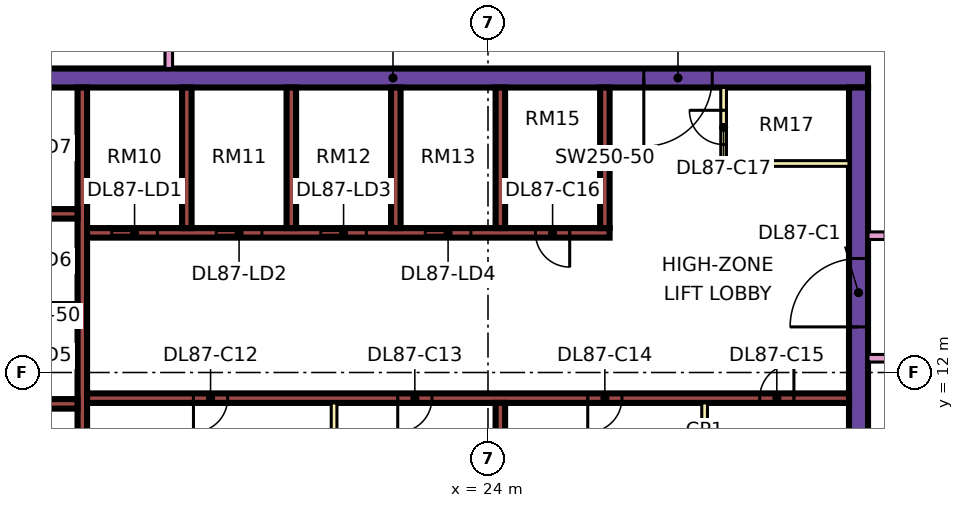
"""IFC4 building model, lengths in metres.
Left out: names, types, materials, properties, quantities, classifications, styles, units other than length and angle.
Written with IfcOpenShell. Run it as: python <this file> out.ifc"""

import sys

from ifc_helpers import new_model, si_unit, direction, frame, frame_2d, origin, place, context, subcontext, project, spatial, rectangle, extrude, element, fill, save


model = new_model("IFC4")
c1 = context("Model", 3, precision=1e-05, world=origin(), true_north=direction((0.0, 1.0)))
c2 = subcontext(c1, "Body", "Model", "MODEL_VIEW")
j1 = project(units=[si_unit("LENGTHUNIT", "METRE"), si_unit("PLANEANGLEUNIT", "RADIAN")], contexts=[c1])
p1 = place(None, origin())
s1 = spatial("IfcSite", under=j1, at=p1, CompositionType="ELEMENT")
p2 = place(p1, origin())
s2 = spatial("IfcBuilding", under=s1, at=p2, CompositionType="ELEMENT")
p3 = place(p2, frame((0.0, 0.0, 372.65)))
s3 = spatial("IfcBuildingStorey", under=s2, at=p3, CompositionType="ELEMENT", Elevation=372.65)
p4 = place(p3, frame((9.0, 19.75, 0.0), z_axis=(0.0, 0.0, 1.0), x_axis=(1.0, 0.0, 0.0)))
e1 = element("IfcWall", 1, at=p4, inside=s3, PredefinedType="SHEAR", context=c2, shape_type="SweptSolid", body=[
    extrude(rectangle(XDim=25.0, YDim=0.5, at=frame_2d((12.5, 0.0))), origin(), (0.0, 0.0, 1.0), 3.75),
])
p5 = place(p4, frame((19.1, 0.0, 0.0)))
e2 = element("IfcOpeningElement", 2, at=p5, cuts=e1, PredefinedType="OPENING", context=c2, shape_type="SweptSolid", body=[
    extrude(rectangle(XDim=1.8, YDim=2.4, at=frame_2d((0.9, 1.2))), frame((0.0, 0.26, 0.0), z_axis=(0.0, -1.0, 0.0), x_axis=(1.0, 0.0, 0.0)), (0.0, 0.0, 1.0), 0.52),
])
p6 = place(p3, frame((33.75, 7.5, 0.0), z_axis=(0.0, 0.0, 1.0), x_axis=(0.0, 1.0, 0.0)))
e3 = element("IfcWall", 3, at=p6, inside=s3, PredefinedType="SHEAR", context=c2, shape_type="SweptSolid", body=[
    extrude(rectangle(XDim=12.0, YDim=0.5, at=frame_2d((6.0, 0.0))), origin(), (0.0, 0.0, 1.0), 3.75),
])
p7 = place(p6, frame((5.7, 0.0, 0.0)))
e4 = element("IfcOpeningElement", 4, at=p7, cuts=e3, PredefinedType="OPENING", context=c2, shape_type="SweptSolid", body=[
    extrude(rectangle(XDim=1.8, YDim=2.4, at=frame_2d((0.9, 1.2))), frame((0.0, 0.26, 0.0), z_axis=(0.0, -1.0, 0.0), x_axis=(1.0, 0.0, 0.0)), (0.0, 0.0, 1.0), 0.52),
])
p8 = place(p3, frame((13.325, 7.5, 0.0), z_axis=(0.0, 0.0, 1.0), x_axis=(0.0, 1.0, 0.0)))
e5 = element("IfcWall", 5, at=p8, inside=s3, PredefinedType="SHEAR", context=c2, shape_type="SweptSolid", body=[
    extrude(rectangle(XDim=12.0, YDim=0.25, at=frame_2d((6.0, 0.0))), origin(), (0.0, 0.0, 1.0), 3.75),
])
p9 = place(p3, frame((13.45, 11.325, 0.0), z_axis=(0.0, 0.0, 1.0), x_axis=(1.0, 0.0, 0.0)))
e6 = element("IfcWall", 6, at=p9, inside=s3, PredefinedType="SHEAR", context=c2, shape_type="SweptSolid", body=[
    extrude(rectangle(XDim=20.05, YDim=0.25, at=frame_2d((10.025, 0.0))), origin(), (0.0, 0.0, 1.0), 3.75),
])
p10 = place(p9, frame((2.8, 0.0, 0.0)))
e7 = element("IfcOpeningElement", 7, at=p10, cuts=e6, PredefinedType="OPENING", context=c2, shape_type="SweptSolid", body=[
    extrude(rectangle(XDim=0.9, YDim=2.1, at=frame_2d((0.45, 1.05))), frame((0.0, 0.135, 0.0), z_axis=(0.0, -1.0, 0.0), x_axis=(1.0, 0.0, 0.0)), (0.0, 0.0, 1.0), 0.27),
])
p11 = place(p9, frame((8.175, 0.0, 0.0)))
e8 = element("IfcOpeningElement", 8, at=p11, cuts=e6, PredefinedType="OPENING", context=c2, shape_type="SweptSolid", body=[
    extrude(rectangle(XDim=0.9, YDim=2.1, at=frame_2d((0.45, 1.05))), frame((0.0, 0.135, 0.0), z_axis=(0.0, -1.0, 0.0), x_axis=(1.0, 0.0, 0.0)), (0.0, 0.0, 1.0), 0.27),
])
p12 = place(p9, frame((13.175, 0.0, 0.0)))
e9 = element("IfcOpeningElement", 9, at=p12, cuts=e6, PredefinedType="OPENING", context=c2, shape_type="SweptSolid", body=[
    extrude(rectangle(XDim=0.9, YDim=2.1, at=frame_2d((0.45, 1.05))), frame((0.0, 0.135, 0.0), z_axis=(0.0, -1.0, 0.0), x_axis=(1.0, 0.0, 0.0)), (0.0, 0.0, 1.0), 0.27),
])
p13 = place(p9, frame((17.7, 0.0, 0.0)))
e10 = element("IfcOpeningElement", 10, at=p13, cuts=e6, PredefinedType="OPENING", context=c2, shape_type="SweptSolid", body=[
    extrude(rectangle(XDim=0.9, YDim=2.1, at=frame_2d((0.45, 1.05))), frame((0.0, 0.135, 0.0), z_axis=(0.0, -1.0, 0.0), x_axis=(1.0, 0.0, 0.0)), (0.0, 0.0, 1.0), 0.27),
])
p14 = place(p3, frame((13.45, 15.675, 0.0), z_axis=(0.0, 0.0, 1.0), x_axis=(1.0, 0.0, 0.0)))
e11 = element("IfcWall", 11, at=p14, inside=s3, PredefinedType="SHEAR", context=c2, shape_type="SweptSolid", body=[
    extrude(rectangle(XDim=13.75, YDim=0.25, at=frame_2d((6.875, 0.0))), origin(), (0.0, 0.0, 1.0), 3.75),
])
p15 = place(p14, frame((0.65, 0.0, 0.0)))
e12 = element("IfcOpeningElement", 12, at=p15, cuts=e11, PredefinedType="OPENING", context=c2, shape_type="SweptSolid", body=[
    extrude(rectangle(XDim=1.2, YDim=2.2, at=frame_2d((0.6, 1.1))), frame((0.0, 0.135, 0.0), z_axis=(0.0, -1.0, 0.0), x_axis=(1.0, 0.0, 0.0)), (0.0, 0.0, 1.0), 0.27),
])
p16 = place(p14, frame((3.4, 0.0, 0.0)))
e13 = element("IfcOpeningElement", 13, at=p16, cuts=e11, PredefinedType="OPENING", context=c2, shape_type="SweptSolid", body=[
    extrude(rectangle(XDim=1.2, YDim=2.2, at=frame_2d((0.6, 1.1))), frame((0.0, 0.135, 0.0), z_axis=(0.0, -1.0, 0.0), x_axis=(1.0, 0.0, 0.0)), (0.0, 0.0, 1.0), 0.27),
])
p17 = place(p14, frame((6.15, 0.0, 0.0)))
e14 = element("IfcOpeningElement", 14, at=p17, cuts=e11, PredefinedType="OPENING", context=c2, shape_type="SweptSolid", body=[
    extrude(rectangle(XDim=1.2, YDim=2.2, at=frame_2d((0.6, 1.1))), frame((0.0, 0.135, 0.0), z_axis=(0.0, -1.0, 0.0), x_axis=(1.0, 0.0, 0.0)), (0.0, 0.0, 1.0), 0.27),
])
p18 = place(p14, frame((8.9, 0.0, 0.0)))
e15 = element("IfcOpeningElement", 15, at=p18, cuts=e11, PredefinedType="OPENING", context=c2, shape_type="SweptSolid", body=[
    extrude(rectangle(XDim=1.2, YDim=2.2, at=frame_2d((0.6, 1.1))), frame((0.0, 0.135, 0.0), z_axis=(0.0, -1.0, 0.0), x_axis=(1.0, 0.0, 0.0)), (0.0, 0.0, 1.0), 0.27),
])
p19 = place(p14, frame((11.8, 0.0, 0.0)))
e16 = element("IfcOpeningElement", 16, at=p19, cuts=e11, PredefinedType="OPENING", context=c2, shape_type="SweptSolid", body=[
    extrude(rectangle(XDim=0.9, YDim=2.1, at=frame_2d((0.45, 1.05))), frame((0.0, 0.135, 0.0), z_axis=(0.0, -1.0, 0.0), x_axis=(1.0, 0.0, 0.0)), (0.0, 0.0, 1.0), 0.27),
])
for number, where, z_axis, x_axis in (
    (17, (10.2, 11.175, 0.0), (0.0, 0.0, 1.0), (1.0, 0.0, 0.0)),
    (18, (10.2, 13.675, 0.0), (0.0, 0.0, 1.0), (1.0, 0.0, 0.0)),
    (19, (10.2, 16.175, 0.0), (0.0, 0.0, 1.0), (1.0, 0.0, 0.0)),
):
    element("IfcWall", number, at=place(p3, frame(where, z_axis=z_axis, x_axis=x_axis)), inside=s3, PredefinedType="SHEAR", context=c2, shape_type="SweptSolid", body=[
        extrude(rectangle(XDim=3.0, YDim=0.25, at=frame_2d((1.5, 0.0))), origin(), (0.0, 0.0, 1.0), 3.75),
    ])
for number, where, z_axis, x_axis in (
    (20, (24.325, 7.5, 0.0), (0.0, 0.0, 1.0), (0.0, 1.0, 0.0)),
    (21, (16.075, 15.8, 0.0), (0.0, 0.0, 1.0), (0.0, 1.0, 0.0)),
    (22, (18.825, 15.8, 0.0), (0.0, 0.0, 1.0), (0.0, 1.0, 0.0)),
    (23, (21.575, 15.8, 0.0), (0.0, 0.0, 1.0), (0.0, 1.0, 0.0)),
    (24, (24.325, 15.8, 0.0), (0.0, 0.0, 1.0), (0.0, 1.0, 0.0)),
    (25, (27.075, 15.8, 0.0), (0.0, 0.0, 1.0), (0.0, 1.0, 0.0)),
):
    element("IfcWall", number, at=place(p3, frame(where, z_axis=z_axis, x_axis=x_axis)), inside=s3, PredefinedType="SHEAR", context=c2, shape_type="SweptSolid", body=[
        extrude(rectangle(XDim=3.7, YDim=0.25, at=frame_2d((1.85, 0.0))), origin(), (0.0, 0.0, 1.0), 3.75),
    ])
p20 = place(p3, frame((-1.447, 12.553, 0.0), z_axis=(0.0, 0.0, 1.0), x_axis=(0.707106781187, -0.707106781187, 0.0)))
e26 = element("IfcWall", 26, at=p20, inside=s3, PredefinedType="SOLIDWALL", context=c2, shape_type="SweptSolid", body=[
    extrude(rectangle(XDim=19.799, YDim=0.15, at=frame_2d((9.899, 0.0))), origin(), (0.0, 0.0, 1.0), 3.35),
])
p21 = place(p20, frame((2.212, 0.0, 0.45)))
e27 = element("IfcOpeningElement", 27, at=p21, cuts=e26, PredefinedType="OPENING", context=c2, shape_type="SweptSolid", body=[
    extrude(rectangle(XDim=3.0, YDim=2.4, at=frame_2d((1.5, 1.2))), frame((0.0, 0.085, 0.0), z_axis=(0.0, -1.0, 0.0), x_axis=(1.0, 0.0, 0.0)), (0.0, 0.0, 1.0), 0.17),
])
p22 = place(p20, frame((10.216, 0.0, 0.45)))
e28 = element("IfcOpeningElement", 28, at=p22, cuts=e26, PredefinedType="OPENING", context=c2, shape_type="SweptSolid", body=[
    extrude(rectangle(XDim=3.0, YDim=2.4, at=frame_2d((1.5, 1.2))), frame((0.0, 0.085, 0.0), z_axis=(0.0, -1.0, 0.0), x_axis=(1.0, 0.0, 0.0)), (0.0, 0.0, 1.0), 0.17),
])
for number, where, z_axis, x_axis in (
    (29, (19.95, 7.5, 0.0), (0.0, 0.0, 1.0), (0.0, 1.0, 0.0)),
    (30, (29.7, 7.5, 0.0), (0.0, 0.0, 1.0), (0.0, 1.0, 0.0)),
):
    element("IfcWall", number, at=place(p3, frame(where, z_axis=z_axis, x_axis=x_axis)), inside=s3, PredefinedType="PARTITIONING", context=c2, shape_type="SweptSolid", body=[
        extrude(rectangle(XDim=3.7, YDim=0.15, at=frame_2d((1.85, 0.0))), origin(), (0.0, 0.0, 1.0), 3.35),
    ])
p23 = place(p3, frame((30.2, 17.5, 0.0), z_axis=(0.0, 0.0, 1.0), x_axis=(0.0, 1.0, 0.0)))
e31 = element("IfcWall", 31, at=p23, inside=s3, PredefinedType="PARTITIONING", context=c2, shape_type="SweptSolid", body=[
    extrude(rectangle(XDim=2.0, YDim=0.15, at=frame_2d((1.0, 0.0))), origin(), (0.0, 0.0, 1.0), 3.35),
])
p24 = place(p23, frame((0.5, 0.0, 0.0)))
e32 = element("IfcOpeningElement", 32, at=p24, cuts=e31, PredefinedType="OPENING", context=c2, shape_type="SweptSolid", body=[
    extrude(rectangle(XDim=0.9, YDim=2.1, at=frame_2d((0.45, 1.05))), frame((0.0, 0.085, 0.0), z_axis=(0.0, -1.0, 0.0), x_axis=(1.0, 0.0, 0.0)), (0.0, 0.0, 1.0), 0.17),
])
p25 = place(p3, frame((30.2, 17.5, 0.0), z_axis=(0.0, 0.0, 1.0), x_axis=(1.0, 0.0, 0.0)))
e33 = element("IfcWall", 33, at=p25, inside=s3, PredefinedType="PARTITIONING", context=c2, shape_type="SweptSolid", body=[
    extrude(rectangle(XDim=3.3, YDim=0.15, at=frame_2d((1.65, 0.0))), origin(), (0.0, 0.0, 1.0), 3.35),
])
p26 = place(p3, frame((15.6, 20.0, 0.0), z_axis=(0.0, 0.0, 1.0), x_axis=(0.0, 1.0, 0.0)))
e34 = element("IfcWall", 34, at=p26, inside=s3, PredefinedType="PARTITIONING", context=c2, shape_type="SweptSolid", body=[
    extrude(rectangle(XDim=27.775, YDim=0.2, at=frame_2d((13.887, 0.0))), origin(), (0.0, 0.0, 1.0), 3.35),
])
p27 = place(p26, frame((7.15, 0.0, 0.0)))
e35 = element("IfcOpeningElement", 35, at=p27, cuts=e34, PredefinedType="OPENING", context=c2, shape_type="SweptSolid", body=[
    extrude(rectangle(XDim=1.6, YDim=2.1, at=frame_2d((0.8, 1.05))), frame((0.0, 0.11, 0.0), z_axis=(0.0, -1.0, 0.0), x_axis=(1.0, 0.0, 0.0)), (0.0, 0.0, 1.0), 0.22),
])
p28 = place(p26, frame((13.5, 0.0, 0.0)))
e36 = element("IfcOpeningElement", 36, at=p28, cuts=e34, PredefinedType="OPENING", context=c2, shape_type="SweptSolid", body=[
    extrude(rectangle(XDim=1.0, YDim=2.1, at=frame_2d((0.5, 1.05))), frame((0.0, 0.11, 0.0), z_axis=(0.0, -1.0, 0.0), x_axis=(1.0, 0.0, 0.0)), (0.0, 0.0, 1.0), 0.22),
])
p29 = place(p26, frame((23.35, 0.0, 0.0)))
e37 = element("IfcOpeningElement", 37, at=p29, cuts=e34, PredefinedType="OPENING", context=c2, shape_type="SweptSolid", body=[
    extrude(rectangle(XDim=1.0, YDim=2.1, at=frame_2d((0.5, 1.05))), frame((0.0, 0.11, 0.0), z_axis=(0.0, -1.0, 0.0), x_axis=(1.0, 0.0, 0.0)), (0.0, 0.0, 1.0), 0.22),
])
p30 = place(p26, frame((1.15, 0.0, 0.0)))
e38 = element("IfcOpeningElement", 38, at=p30, cuts=e34, PredefinedType="OPENING", context=c2, shape_type="SweptSolid", body=[
    extrude(rectangle(XDim=1.8, YDim=2.1, at=frame_2d((0.9, 1.05))), frame((0.0, 0.11, 0.0), z_axis=(0.0, -1.0, 0.0), x_axis=(1.0, 0.0, 0.0)), (0.0, 0.0, 1.0), 0.22),
])
p31 = place(p26, frame((25.9, 0.0, 0.0)))
e39 = element("IfcOpeningElement", 39, at=p31, cuts=e34, PredefinedType="OPENING", context=c2, shape_type="SweptSolid", body=[
    extrude(rectangle(XDim=1.0, YDim=2.1, at=frame_2d((0.5, 1.05))), frame((0.0, 0.11, 0.0), z_axis=(0.0, -1.0, 0.0), x_axis=(1.0, 0.0, 0.0)), (0.0, 0.0, 1.0), 0.22),
])
p32 = place(p3, frame((34.0, 12.375, 0.0), z_axis=(0.0, 0.0, 1.0), x_axis=(1.0, 0.0, 0.0)))
e40 = element("IfcWall", 40, at=p32, inside=s3, PredefinedType="PARTITIONING", context=c2, shape_type="SweptSolid", body=[
    extrude(rectangle(XDim=2.376, YDim=0.2, at=frame_2d((1.188, 0.0))), origin(), (0.0, 0.0, 1.0), 3.35),
])
p33 = place(p3, frame((34.0, 15.6, 0.0), z_axis=(0.0, 0.0, 1.0), x_axis=(1.0, 0.0, 0.0)))
e41 = element("IfcWall", 41, at=p33, inside=s3, PredefinedType="PARTITIONING", context=c2, shape_type="SweptSolid", body=[
    extrude(rectangle(XDim=10.35, YDim=0.2, at=frame_2d((5.175, 0.0))), origin(), (0.0, 0.0, 1.0), 3.35),
])
p34 = place(p33, frame((5.6, 0.0, 0.0)))
e42 = element("IfcOpeningElement", 42, at=p34, cuts=e41, PredefinedType="OPENING", context=c2, shape_type="SweptSolid", body=[
    extrude(rectangle(XDim=1.0, YDim=2.1, at=frame_2d((0.5, 1.05))), frame((0.0, 0.11, 0.0), z_axis=(0.0, -1.0, 0.0), x_axis=(1.0, 0.0, 0.0)), (0.0, 0.0, 1.0), 0.22),
])
p35 = place(p33, frame((0.45, 0.0, 0.0)))
e43 = element("IfcOpeningElement", 43, at=p35, cuts=e41, PredefinedType="OPENING", context=c2, shape_type="SweptSolid", body=[
    extrude(rectangle(XDim=1.2, YDim=2.1, at=frame_2d((0.6, 1.05))), frame((0.0, 0.11, 0.0), z_axis=(0.0, -1.0, 0.0), x_axis=(1.0, 0.0, 0.0)), (0.0, 0.0, 1.0), 0.22),
])
p36 = place(p15, origin())
e44 = element("IfcDoor", 44, at=p36, inside=s3, OperationType="DOUBLE_DOOR_SLIDING", PredefinedType="DOOR", context=c2, shape_type="SweptSolid", body=[
    extrude(rectangle(XDim=1.2, YDim=2.2, at=frame_2d((0.6, 1.1))), frame((0.0, 0.025, 0.0), z_axis=(0.0, -1.0, 0.0), x_axis=(1.0, 0.0, 0.0)), (0.0, 0.0, 1.0), 0.05),
])
fill(e12, e44)
p37 = place(p16, origin())
e45 = element("IfcDoor", 45, at=p37, inside=s3, OperationType="DOUBLE_DOOR_SLIDING", PredefinedType="DOOR", context=c2, shape_type="SweptSolid", body=[
    extrude(rectangle(XDim=1.2, YDim=2.2, at=frame_2d((0.6, 1.1))), frame((0.0, 0.025, 0.0), z_axis=(0.0, -1.0, 0.0), x_axis=(1.0, 0.0, 0.0)), (0.0, 0.0, 1.0), 0.05),
])
fill(e13, e45)
p38 = place(p17, origin())
e46 = element("IfcDoor", 46, at=p38, inside=s3, OperationType="DOUBLE_DOOR_SLIDING", PredefinedType="DOOR", context=c2, shape_type="SweptSolid", body=[
    extrude(rectangle(XDim=1.2, YDim=2.2, at=frame_2d((0.6, 1.1))), frame((0.0, 0.025, 0.0), z_axis=(0.0, -1.0, 0.0), x_axis=(1.0, 0.0, 0.0)), (0.0, 0.0, 1.0), 0.05),
])
fill(e14, e46)
p39 = place(p18, origin())
e47 = element("IfcDoor", 47, at=p39, inside=s3, OperationType="DOUBLE_DOOR_SLIDING", PredefinedType="DOOR", context=c2, shape_type="SweptSolid", body=[
    extrude(rectangle(XDim=1.2, YDim=2.2, at=frame_2d((0.6, 1.1))), frame((0.0, 0.025, 0.0), z_axis=(0.0, -1.0, 0.0), x_axis=(1.0, 0.0, 0.0)), (0.0, 0.0, 1.0), 0.05),
])
fill(e15, e47)
p40 = place(p7, origin())
e48 = element("IfcDoor", 48, at=p40, inside=s3, OperationType="DOUBLE_DOOR_SINGLE_SWING", PredefinedType="DOOR", context=c2, shape_type="SweptSolid", body=[
    extrude(rectangle(XDim=1.8, YDim=2.4, at=frame_2d((0.9, 1.2))), frame((0.0, 0.025, 0.0), z_axis=(0.0, -1.0, 0.0), x_axis=(1.0, 0.0, 0.0)), (0.0, 0.0, 1.0), 0.05),
])
fill(e4, e48)
p41 = place(p5, frame((1.8, 0.0, 0.0), z_axis=(0.0, 0.0, 1.0), x_axis=(-1.0, 0.0, 0.0)))
e49 = element("IfcDoor", 49, at=p41, inside=s3, OperationType="DOUBLE_DOOR_SINGLE_SWING", PredefinedType="DOOR", context=c2, shape_type="SweptSolid", body=[
    extrude(rectangle(XDim=1.8, YDim=2.4, at=frame_2d((0.9, 1.2))), frame((0.0, 0.025, 0.0), z_axis=(0.0, -1.0, 0.0), x_axis=(1.0, 0.0, 0.0)), (0.0, 0.0, 1.0), 0.05),
])
fill(e2, e49)
p42 = place(p10, frame((0.9, 0.0, 0.0), z_axis=(0.0, 0.0, 1.0), x_axis=(-1.0, 0.0, 0.0)))
e50 = element("IfcDoor", 50, at=p42, inside=s3, OperationType="SINGLE_SWING_LEFT", PredefinedType="DOOR", context=c2, shape_type="SweptSolid", body=[
    extrude(rectangle(XDim=0.9, YDim=2.1, at=frame_2d((0.45, 1.05))), frame((0.0, 0.025, 0.0), z_axis=(0.0, -1.0, 0.0), x_axis=(1.0, 0.0, 0.0)), (0.0, 0.0, 1.0), 0.05),
])
fill(e7, e50)
p43 = place(p11, frame((0.9, 0.0, 0.0), z_axis=(0.0, 0.0, 1.0), x_axis=(-1.0, 0.0, 0.0)))
e51 = element("IfcDoor", 51, at=p43, inside=s3, OperationType="SINGLE_SWING_LEFT", PredefinedType="DOOR", context=c2, shape_type="SweptSolid", body=[
    extrude(rectangle(XDim=0.9, YDim=2.1, at=frame_2d((0.45, 1.05))), frame((0.0, 0.025, 0.0), z_axis=(0.0, -1.0, 0.0), x_axis=(1.0, 0.0, 0.0)), (0.0, 0.0, 1.0), 0.05),
])
fill(e8, e51)
p44 = place(p12, frame((0.9, 0.0, 0.0), z_axis=(0.0, 0.0, 1.0), x_axis=(-1.0, 0.0, 0.0)))
e52 = element("IfcDoor", 52, at=p44, inside=s3, OperationType="SINGLE_SWING_LEFT", PredefinedType="DOOR", context=c2, shape_type="SweptSolid", body=[
    extrude(rectangle(XDim=0.9, YDim=2.1, at=frame_2d((0.45, 1.05))), frame((0.0, 0.025, 0.0), z_axis=(0.0, -1.0, 0.0), x_axis=(1.0, 0.0, 0.0)), (0.0, 0.0, 1.0), 0.05),
])
fill(e9, e52)
p45 = place(p13, frame((0.9, 0.0, 0.0), z_axis=(0.0, 0.0, 1.0), x_axis=(-1.0, 0.0, 0.0)))
e53 = element("IfcDoor", 53, at=p45, inside=s3, OperationType="SINGLE_SWING_RIGHT", PredefinedType="DOOR", context=c2, shape_type="SweptSolid", body=[
    extrude(rectangle(XDim=0.9, YDim=2.1, at=frame_2d((0.45, 1.05))), frame((0.0, 0.025, 0.0), z_axis=(0.0, -1.0, 0.0), x_axis=(1.0, 0.0, 0.0)), (0.0, 0.0, 1.0), 0.05),
])
fill(e10, e53)
p46 = place(p19, origin())
e54 = element("IfcDoor", 54, at=p46, inside=s3, OperationType="SINGLE_SWING_RIGHT", PredefinedType="DOOR", context=c2, shape_type="SweptSolid", body=[
    extrude(rectangle(XDim=0.9, YDim=2.1, at=frame_2d((0.45, 1.05))), frame((0.0, 0.025, 0.0), z_axis=(0.0, -1.0, 0.0), x_axis=(1.0, 0.0, 0.0)), (0.0, 0.0, 1.0), 0.05),
])
fill(e16, e54)
p47 = place(p24, frame((0.9, 0.0, 0.0), z_axis=(0.0, 0.0, 1.0), x_axis=(-1.0, 0.0, 0.0)))
e55 = element("IfcDoor", 55, at=p47, inside=s3, OperationType="SINGLE_SWING_RIGHT", PredefinedType="DOOR", context=c2, shape_type="SweptSolid", body=[
    extrude(rectangle(XDim=0.9, YDim=2.1, at=frame_2d((0.45, 1.05))), frame((0.0, 0.025, 0.0), z_axis=(0.0, -1.0, 0.0), x_axis=(1.0, 0.0, 0.0)), (0.0, 0.0, 1.0), 0.05),
])
fill(e32, e55)
save(model, sys.argv[1])
